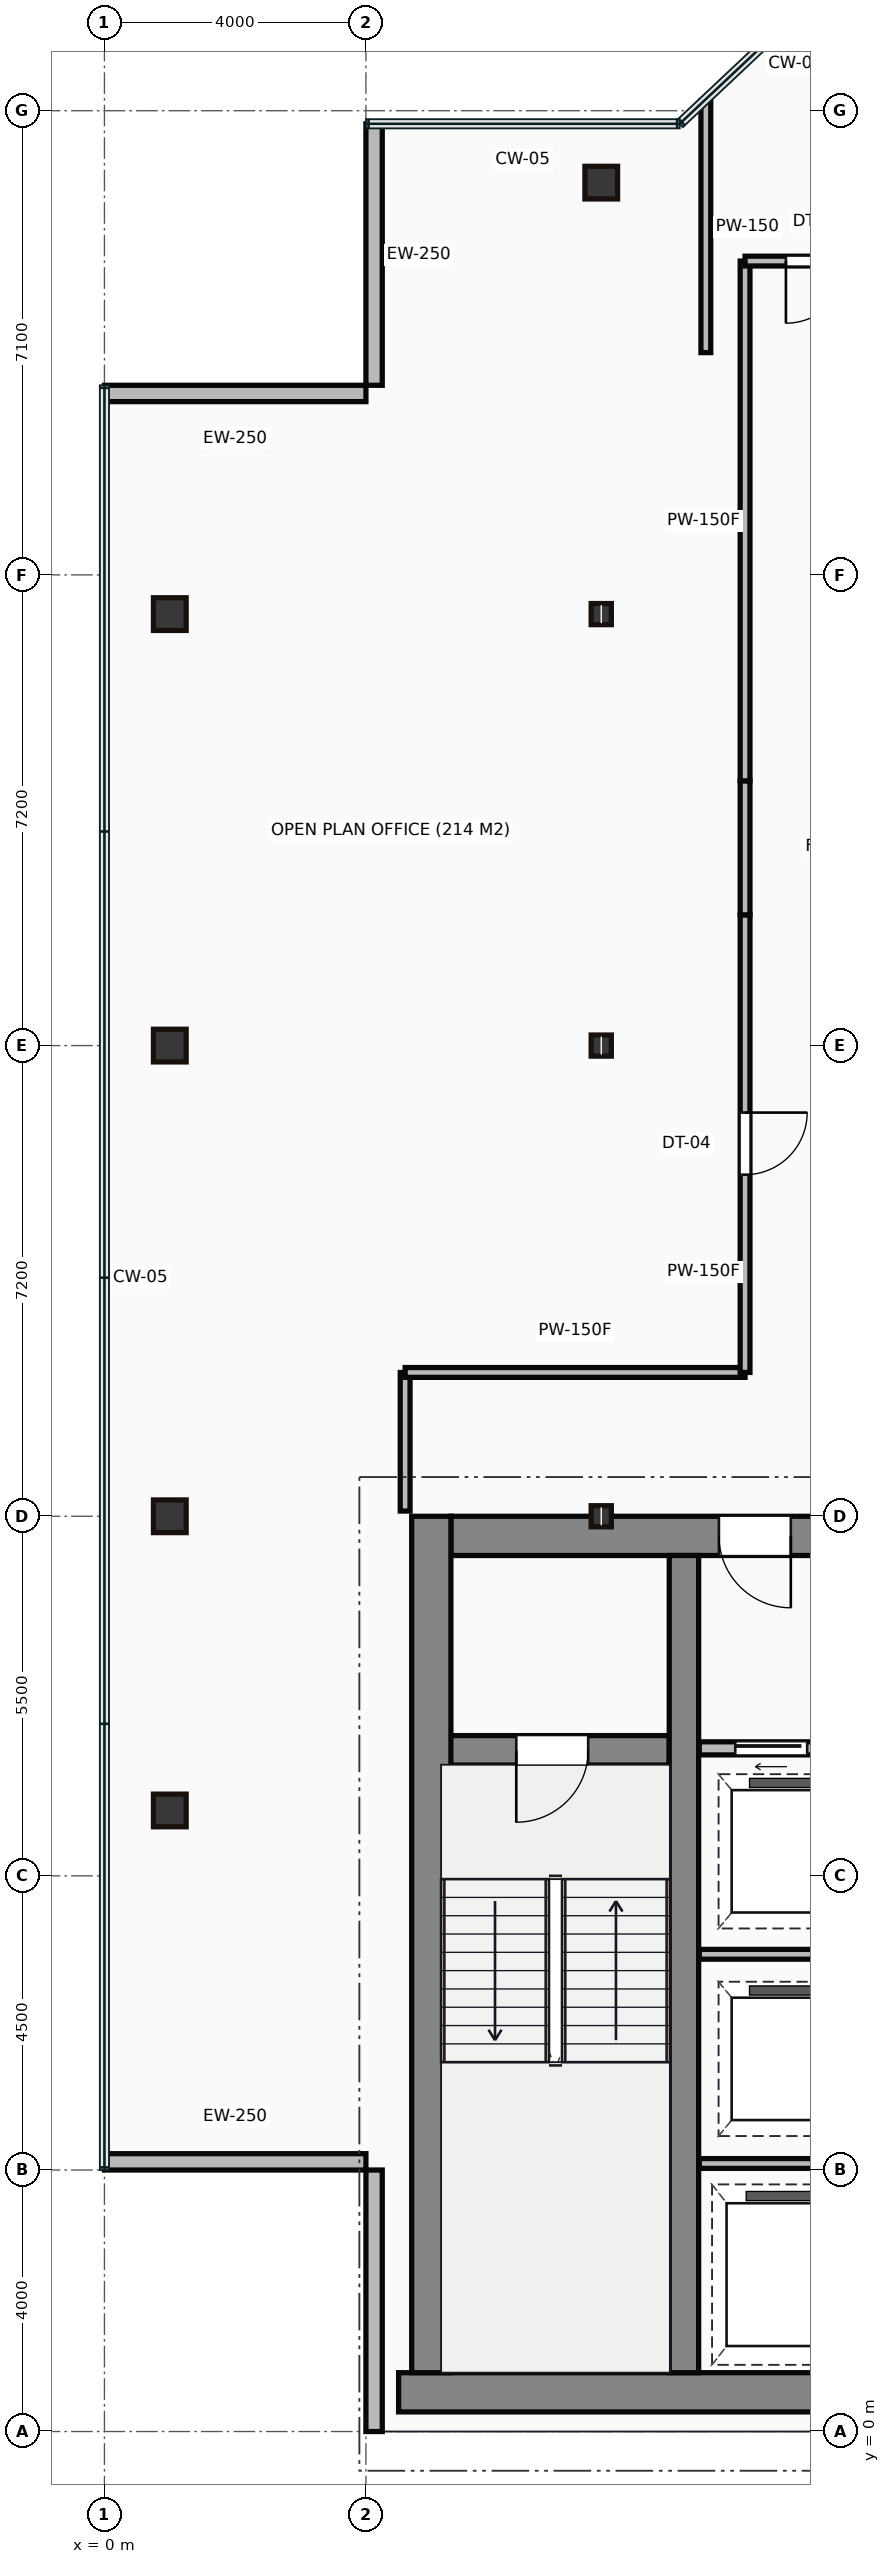
"""IFC4 building model, lengths in metres.
Left out: names, types, materials, properties, quantities, classifications, styles, units other than length and angle.
Written with IfcOpenShell. Run it as: python <this file> out.ifc"""

import sys

from ifc_helpers import new_model, si_unit, direction, frame, frame_2d, origin, origin_2d, place, context, subcontext, project, spatial, rectangle, hollow_rectangle, i_section, extrude, source, transform, mapped, element, fill, save


model = new_model("IFC4")
c1 = context("Model", 3, precision=1e-05, world=origin(), true_north=direction((0.0, 1.0)))
c2 = subcontext(c1, "Body", "Model", "MODEL_VIEW")
j1 = project(units=[si_unit("LENGTHUNIT", "METRE"), si_unit("PLANEANGLEUNIT", "RADIAN")], contexts=[c1])
p1 = place(None, origin())
s1 = spatial("IfcSite", under=j1, at=p1, CompositionType="ELEMENT")
p2 = place(p1, origin())
s2 = spatial("IfcBuilding", under=s1, at=p2, CompositionType="ELEMENT")
p3 = place(p2, frame((0.0, 0.0, 232.4)))
s3 = spatial("IfcBuildingStorey", under=s2, at=p3, CompositionType="ELEMENT", Elevation=232.4)
m1 = source(origin(), c2, "Body", "SweptSolid", [
    extrude(rectangle(XDim=29.5, YDim=0.6, at=frame_2d((14.75, 0.0))), origin(), (0.0, 0.0, 1.0), 3.65),
])
p4 = place(p3, frame((4.5, 0.6, 0.0), z_axis=(0.0, 0.0, 1.0), x_axis=(1.0, 0.0, 0.0)))
e1 = element("IfcWall", 1, at=p4, inside=s3, PredefinedType="SHEAR", context=c2, shape_type="MappedRepresentation", body=[
    mapped(m1, transform((0.0, 0.0, 0.0))),
])
m2 = source(origin(), c2, "Body", "SweptSolid", [
    extrude(rectangle(XDim=13.1, YDim=0.6, at=frame_2d((6.55, 0.0))), origin(), (0.0, 0.0, 1.0), 3.65),
])
p5 = place(p3, frame((5.0, 0.9, 0.0), z_axis=(0.0, 0.0, 1.0), x_axis=(0.0, 1.0, 0.0)))
e2 = element("IfcWall", 2, at=p5, inside=s3, PredefinedType="SHEAR", context=c2, shape_type="MappedRepresentation", body=[
    mapped(m2, transform((0.0, 0.0, 0.0))),
])
m3 = source(origin(), c2, "Body", "SweptSolid", [
    extrude(rectangle(XDim=9.1, YDim=0.6, at=frame_2d((4.55, 0.0))), origin(), (0.0, 0.0, 1.0), 3.65),
])
p6 = place(p3, frame((5.3, 13.7, 0.0), z_axis=(0.0, 0.0, 1.0), x_axis=(1.0, 0.0, 0.0)))
e3 = element("IfcWall", 3, at=p6, inside=s3, PredefinedType="SHEAR", context=c2, shape_type="MappedRepresentation", body=[
    mapped(m3, transform((0.0, 0.0, 0.0))),
])
p7 = place(p6, frame((4.1, 0.0, 0.0)))
e4 = element("IfcOpeningElement", 4, at=p7, cuts=e3, PredefinedType="OPENING", context=c2, shape_type="SweptSolid", body=[
    extrude(rectangle(XDim=1.1, YDim=2.15, at=frame_2d((0.55, 1.075))), frame((0.0, 0.31, 0.0), z_axis=(0.0, -1.0, 0.0), x_axis=(1.0, 0.0, 0.0)), (0.0, 0.0, 1.0), 0.62),
])
m4 = source(origin(), c2, "Body", "SweptSolid", [
    extrude(rectangle(XDim=12.5, YDim=0.45, at=frame_2d((6.25, 0.0))), origin(), (0.0, 0.0, 1.0), 3.65),
])
p8 = place(p3, frame((8.865, 0.9, 0.0), z_axis=(0.0, 0.0, 1.0), x_axis=(0.0, 1.0, 0.0)))
e5 = element("IfcWall", 5, at=p8, inside=s3, PredefinedType="SHEAR", context=c2, shape_type="MappedRepresentation", body=[
    mapped(m4, transform((0.0, 0.0, 0.0))),
])
m5 = source(origin(), c2, "Body", "SweptSolid", [
    extrude(rectangle(XDim=3.39, YDim=0.45, at=frame_2d((1.695, 0.0))), origin(), (0.0, 0.0, 1.0), 3.65),
])
p9 = place(p3, frame((5.25, 10.42, 0.0), z_axis=(0.0, 0.0, 1.0), x_axis=(1.0, 0.0, 0.0)))
e6 = element("IfcWall", 6, at=p9, inside=s3, PredefinedType="SHEAR", context=c2, shape_type="MappedRepresentation", body=[
    mapped(m5, transform((0.0, 0.0, 0.0))),
])
p10 = place(p9, frame((1.05, 0.0, 0.0)))
e7 = element("IfcOpeningElement", 7, at=p10, cuts=e6, PredefinedType="OPENING", context=c2, shape_type="SweptSolid", body=[
    extrude(rectangle(XDim=1.1, YDim=2.15, at=frame_2d((0.55, 1.075))), frame((0.0, 0.235, 0.0), z_axis=(0.0, -1.0, 0.0), x_axis=(1.0, 0.0, 0.0)), (0.0, 0.0, 1.0), 0.47),
])
m6 = source(origin(), c2, "Body", "SweptSolid", [
    extrude(hollow_rectangle(XDim=0.5, YDim=0.5, WallThickness=0.022, at=origin_2d()), origin(), (0.0, 0.0, 1.0), 3.65),
])
for number, where, z_axis, x_axis in (
    (8, (1.0, 9.5, 0.0), (0.0, 0.0, 1.0), (1.0, 0.0, 0.0)),
    (9, (1.0, 14.0, 0.0), (0.0, 0.0, 1.0), (1.0, 0.0, 0.0)),
    (10, (1.0, 21.2, 0.0), (0.0, 0.0, 1.0), (1.0, 0.0, 0.0)),
    (11, (1.0, 27.8, 0.0), (0.0, 0.0, 1.0), (1.0, 0.0, 0.0)),
):
    element("IfcColumn", number, at=place(p3, frame(where, z_axis=z_axis, x_axis=x_axis)), inside=s3, PredefinedType="COLUMN", context=c2, shape_type="MappedRepresentation", body=[
        mapped(m6, transform((0.0, 0.0, 0.0))),
    ])
m7 = source(origin(), c2, "Body", "SweptSolid", [
    extrude(i_section(OverallWidth=0.309, OverallDepth=0.323, WebThickness=0.014, FlangeThickness=0.023, at=origin_2d()), origin(), (0.0, 0.0, 1.0), 3.65),
])
for number, where, z_axis, x_axis in (
    (12, (7.6, 14.0, 0.0), (0.0, 0.0, 1.0), (1.0, 0.0, 0.0)),
    (13, (7.6, 21.2, 0.0), (0.0, 0.0, 1.0), (1.0, 0.0, 0.0)),
    (14, (7.6, 27.8, 0.0), (0.0, 0.0, 1.0), (1.0, 0.0, 0.0)),
):
    element("IfcColumn", number, at=place(p3, frame(where, z_axis=z_axis, x_axis=x_axis)), inside=s3, PredefinedType="COLUMN", context=c2, shape_type="MappedRepresentation", body=[
        mapped(m7, transform((0.0, 0.0, 0.0))),
    ])
p11 = place(p3, frame((7.6, 34.4, 0.0), z_axis=(0.0, 0.0, 1.0), x_axis=(1.0, 0.0, 0.0)))
e15 = element("IfcColumn", 15, at=p11, inside=s3, PredefinedType="COLUMN", context=c2, shape_type="MappedRepresentation", body=[
    mapped(m6, transform((0.0, 0.0, 0.0))),
])
m8 = source(origin(), c2, "Body", "SweptSolid", [
    extrude(rectangle(XDim=4.0, YDim=0.25, at=frame_2d((2.0, 0.0))), origin(), (0.0, 0.0, 1.0), 3.35),
])
for number, where, z_axis, x_axis in (
    (16, (4.125, 35.3, 0.0), (0.0, 0.0, 1.0), (0.0, -1.0, 0.0)),
    (17, (4.0, 31.175, 0.0), (0.0, 0.0, 1.0), (-1.0, 0.0, 0.0)),
    (18, (0.0, 4.125, 0.0), (0.0, 0.0, 1.0), (1.0, 0.0, 0.0)),
    (19, (4.125, 4.0, 0.0), (0.0, 0.0, 1.0), (0.0, -1.0, 0.0)),
):
    element("IfcWall", number, at=place(p3, frame(where, z_axis=z_axis, x_axis=x_axis)), inside=s3, PredefinedType="STANDARD", context=c2, shape_type="MappedRepresentation", body=[
        mapped(m8, transform((0.0, 0.0, 0.0))),
    ])
m9 = source(origin(), c2, "Body", "SweptSolid", [
    extrude(rectangle(XDim=2.35, YDim=0.2, at=frame_2d((1.175, 0.0))), origin(), (0.0, 0.0, 1.0), 3.35),
])
p12 = place(p3, frame((9.1, 10.45, 0.0), z_axis=(0.0, 0.0, 1.0), x_axis=(1.0, 0.0, 0.0)))
e20 = element("IfcWall", 20, at=p12, inside=s3, PredefinedType="PARTITIONING", context=c2, shape_type="MappedRepresentation", body=[
    mapped(m9, transform((0.0, 0.0, 0.0))),
])
p13 = place(p12, frame((0.55, 0.0, 0.0)))
e21 = element("IfcOpeningElement", 21, at=p13, cuts=e20, PredefinedType="OPENING", context=c2, shape_type="SweptSolid", body=[
    extrude(rectangle(XDim=1.1, YDim=2.15, at=frame_2d((0.55, 1.075))), frame((0.0, 0.11, 0.0), z_axis=(0.0, -1.0, 0.0), x_axis=(1.0, 0.0, 0.0)), (0.0, 0.0, 1.0), 0.22),
])
m10 = source(origin(), c2, "Body", "SweptSolid", [
    extrude(rectangle(XDim=2.4, YDim=0.15, at=frame_2d((1.2, 0.0))), origin(), (0.0, 0.0, 1.0), 3.35),
])
for number, where, z_axis, x_axis in (
    (22, (9.1, 4.1, 0.0), (0.0, 0.0, 1.0), (1.0, 0.0, 0.0)),
    (23, (9.1, 7.3, 0.0), (0.0, 0.0, 1.0), (1.0, 0.0, 0.0)),
):
    element("IfcWall", number, at=place(p3, frame(where, z_axis=z_axis, x_axis=x_axis)), inside=s3, PredefinedType="PARTITIONING", context=c2, shape_type="MappedRepresentation", body=[
        mapped(m10, transform((0.0, 0.0, 0.0))),
    ])
m11 = source(origin(), c2, "Body", "SweptSolid", [
    extrude(rectangle(XDim=2.12, YDim=0.15, at=frame_2d((1.06, 0.0))), origin(), (0.0, 0.0, 1.0), 3.35),
])
p14 = place(p3, frame((4.6, 14.08, 0.0), z_axis=(0.0, 0.0, 1.0), x_axis=(0.0, 1.0, 0.0)))
e24 = element("IfcWall", 24, at=p14, inside=s3, PredefinedType="PARTITIONING", context=c2, shape_type="MappedRepresentation", body=[
    mapped(m11, transform((0.0, 0.0, 0.0))),
])
m12 = source(origin(), c2, "Body", "SweptSolid", [
    extrude(rectangle(XDim=5.2, YDim=0.15, at=frame_2d((2.6, 0.0))), origin(), (0.0, 0.0, 1.0), 3.35),
])
p15 = place(p3, frame((4.6, 16.2, 0.0), z_axis=(0.0, 0.0, 1.0), x_axis=(1.0, 0.0, 0.0)))
e25 = element("IfcWall", 25, at=p15, inside=s3, PredefinedType="PARTITIONING", context=c2, shape_type="MappedRepresentation", body=[
    mapped(m12, transform((0.0, 0.0, 0.0))),
])
m13 = source(origin(), c2, "Body", "SweptSolid", [
    extrude(rectangle(XDim=7.0, YDim=0.15, at=frame_2d((3.5, 0.0))), origin(), (0.0, 0.0, 1.0), 3.35),
])
p16 = place(p3, frame((9.8, 16.2, 0.0), z_axis=(0.0, 0.0, 1.0), x_axis=(0.0, 1.0, 0.0)))
e26 = element("IfcWall", 26, at=p16, inside=s3, PredefinedType="PARTITIONING", context=c2, shape_type="MappedRepresentation", body=[
    mapped(m13, transform((0.0, 0.0, 0.0))),
])
p17 = place(p16, frame((3.025, 0.0, 0.0)))
e27 = element("IfcOpeningElement", 27, at=p17, cuts=e26, PredefinedType="OPENING", context=c2, shape_type="SweptSolid", body=[
    extrude(rectangle(XDim=0.95, YDim=2.15, at=frame_2d((0.475, 1.075))), frame((0.0, 0.085, 0.0), z_axis=(0.0, -1.0, 0.0), x_axis=(1.0, 0.0, 0.0)), (0.0, 0.0, 1.0), 0.17),
])
m14 = source(origin(), c2, "Body", "SweptSolid", [
    extrude(rectangle(XDim=2.05, YDim=0.15, at=frame_2d((1.025, 0.0))), origin(), (0.0, 0.0, 1.0), 3.35),
])
p18 = place(p3, frame((9.8, 23.2, 0.0), z_axis=(0.0, 0.0, 1.0), x_axis=(0.0, 1.0, 0.0)))
e28 = element("IfcWall", 28, at=p18, inside=s3, PredefinedType="PARTITIONING", context=c2, shape_type="MappedRepresentation", body=[
    mapped(m14, transform((0.0, 0.0, 0.0))),
])
m15 = source(origin(), c2, "Body", "SweptSolid", [
    extrude(rectangle(XDim=7.95, YDim=0.15, at=frame_2d((3.975, 0.0))), origin(), (0.0, 0.0, 1.0), 3.35),
])
p19 = place(p3, frame((9.8, 25.25, 0.0), z_axis=(0.0, 0.0, 1.0), x_axis=(0.0, 1.0, 0.0)))
e29 = element("IfcWall", 29, at=p19, inside=s3, PredefinedType="PARTITIONING", context=c2, shape_type="MappedRepresentation", body=[
    mapped(m15, transform((0.0, 0.0, 0.0))),
])
m16 = source(origin(), c2, "Body", "SweptSolid", [
    extrude(rectangle(XDim=2.2, YDim=0.15, at=frame_2d((1.1, 0.0))), origin(), (0.0, 0.0, 1.0), 3.35),
])
p20 = place(p3, frame((9.8, 33.2, 0.0), z_axis=(0.0, 0.0, 1.0), x_axis=(1.0, 0.0, 0.0)))
e30 = element("IfcWall", 30, at=p20, inside=s3, PredefinedType="PARTITIONING", context=c2, shape_type="MappedRepresentation", body=[
    mapped(m16, transform((0.0, 0.0, 0.0))),
])
p21 = place(p20, frame((0.625, 0.0, 0.0)))
e31 = element("IfcOpeningElement", 31, at=p21, cuts=e30, PredefinedType="OPENING", context=c2, shape_type="SweptSolid", body=[
    extrude(rectangle(XDim=0.95, YDim=2.15, at=frame_2d((0.475, 1.075))), frame((0.0, 0.085, 0.0), z_axis=(0.0, -1.0, 0.0), x_axis=(1.0, 0.0, 0.0)), (0.0, 0.0, 1.0), 0.17),
])
m17 = source(origin(), c2, "Body", "SweptSolid", [
    extrude(rectangle(XDim=3.849, YDim=0.15, at=frame_2d((1.925, 0.0))), origin(), (0.0, 0.0, 1.0), 3.35),
])
p22 = place(p3, frame((9.2, 35.649, 0.0), z_axis=(0.0, 0.0, 1.0), x_axis=(0.0, -1.0, 0.0)))
e32 = element("IfcWall", 32, at=p22, inside=s3, PredefinedType="PARTITIONING", context=c2, shape_type="MappedRepresentation", body=[
    mapped(m17, transform((0.0, 0.0, 0.0))),
])
m18 = source(origin(), c2, "Body", "SweptSolid", [
    extrude(rectangle(XDim=1.1, YDim=2.15, at=frame_2d((0.55, 1.075))), frame((0.0, 0.025, 0.0), z_axis=(0.0, -1.0, 0.0), x_axis=(1.0, 0.0, 0.0)), (0.0, 0.0, 1.0), 0.05),
])
p23 = place(p10, frame((1.1, 0.0, 0.0), z_axis=(0.0, 0.0, 1.0), x_axis=(-1.0, 0.0, 0.0)))
e33 = element("IfcDoor", 33, at=p23, inside=s3, OperationType="SINGLE_SWING_LEFT", PredefinedType="DOOR", context=c2, shape_type="MappedRepresentation", body=[
    mapped(m18, transform((0.0, 0.0, 0.0))),
])
fill(e7, e33)
p24 = place(p7, origin())
e34 = element("IfcDoor", 34, at=p24, inside=s3, OperationType="SINGLE_SWING_RIGHT", PredefinedType="DOOR", context=c2, shape_type="MappedRepresentation", body=[
    mapped(m18, transform((0.0, 0.0, 0.0))),
])
fill(e4, e34)
p25 = place(p13, origin())
e35 = element("IfcDoor", 35, at=p25, inside=s3, OperationType="SLIDING_TO_LEFT", PredefinedType="DOOR", context=c2, shape_type="MappedRepresentation", body=[
    mapped(m18, transform((0.0, 0.0, 0.0))),
])
fill(e21, e35)
m19 = source(origin(), c2, "Body", "SweptSolid", [
    extrude(rectangle(XDim=0.95, YDim=2.15, at=frame_2d((0.475, 1.075))), frame((0.0, 0.025, 0.0), z_axis=(0.0, -1.0, 0.0), x_axis=(1.0, 0.0, 0.0)), (0.0, 0.0, 1.0), 0.05),
])
p26 = place(p17, origin())
e36 = element("IfcDoor", 36, at=p26, inside=s3, OperationType="SINGLE_SWING_RIGHT", PredefinedType="DOOR", context=c2, shape_type="MappedRepresentation", body=[
    mapped(m19, transform((0.0, 0.0, 0.0))),
])
fill(e27, e36)
p27 = place(p21, origin())
e37 = element("IfcDoor", 37, at=p27, inside=s3, OperationType="SINGLE_SWING_LEFT", PredefinedType="DOOR", context=c2, shape_type="MappedRepresentation", body=[
    mapped(m19, transform((0.0, 0.0, 0.0))),
])
fill(e31, e37)
save(model, sys.argv[1])
